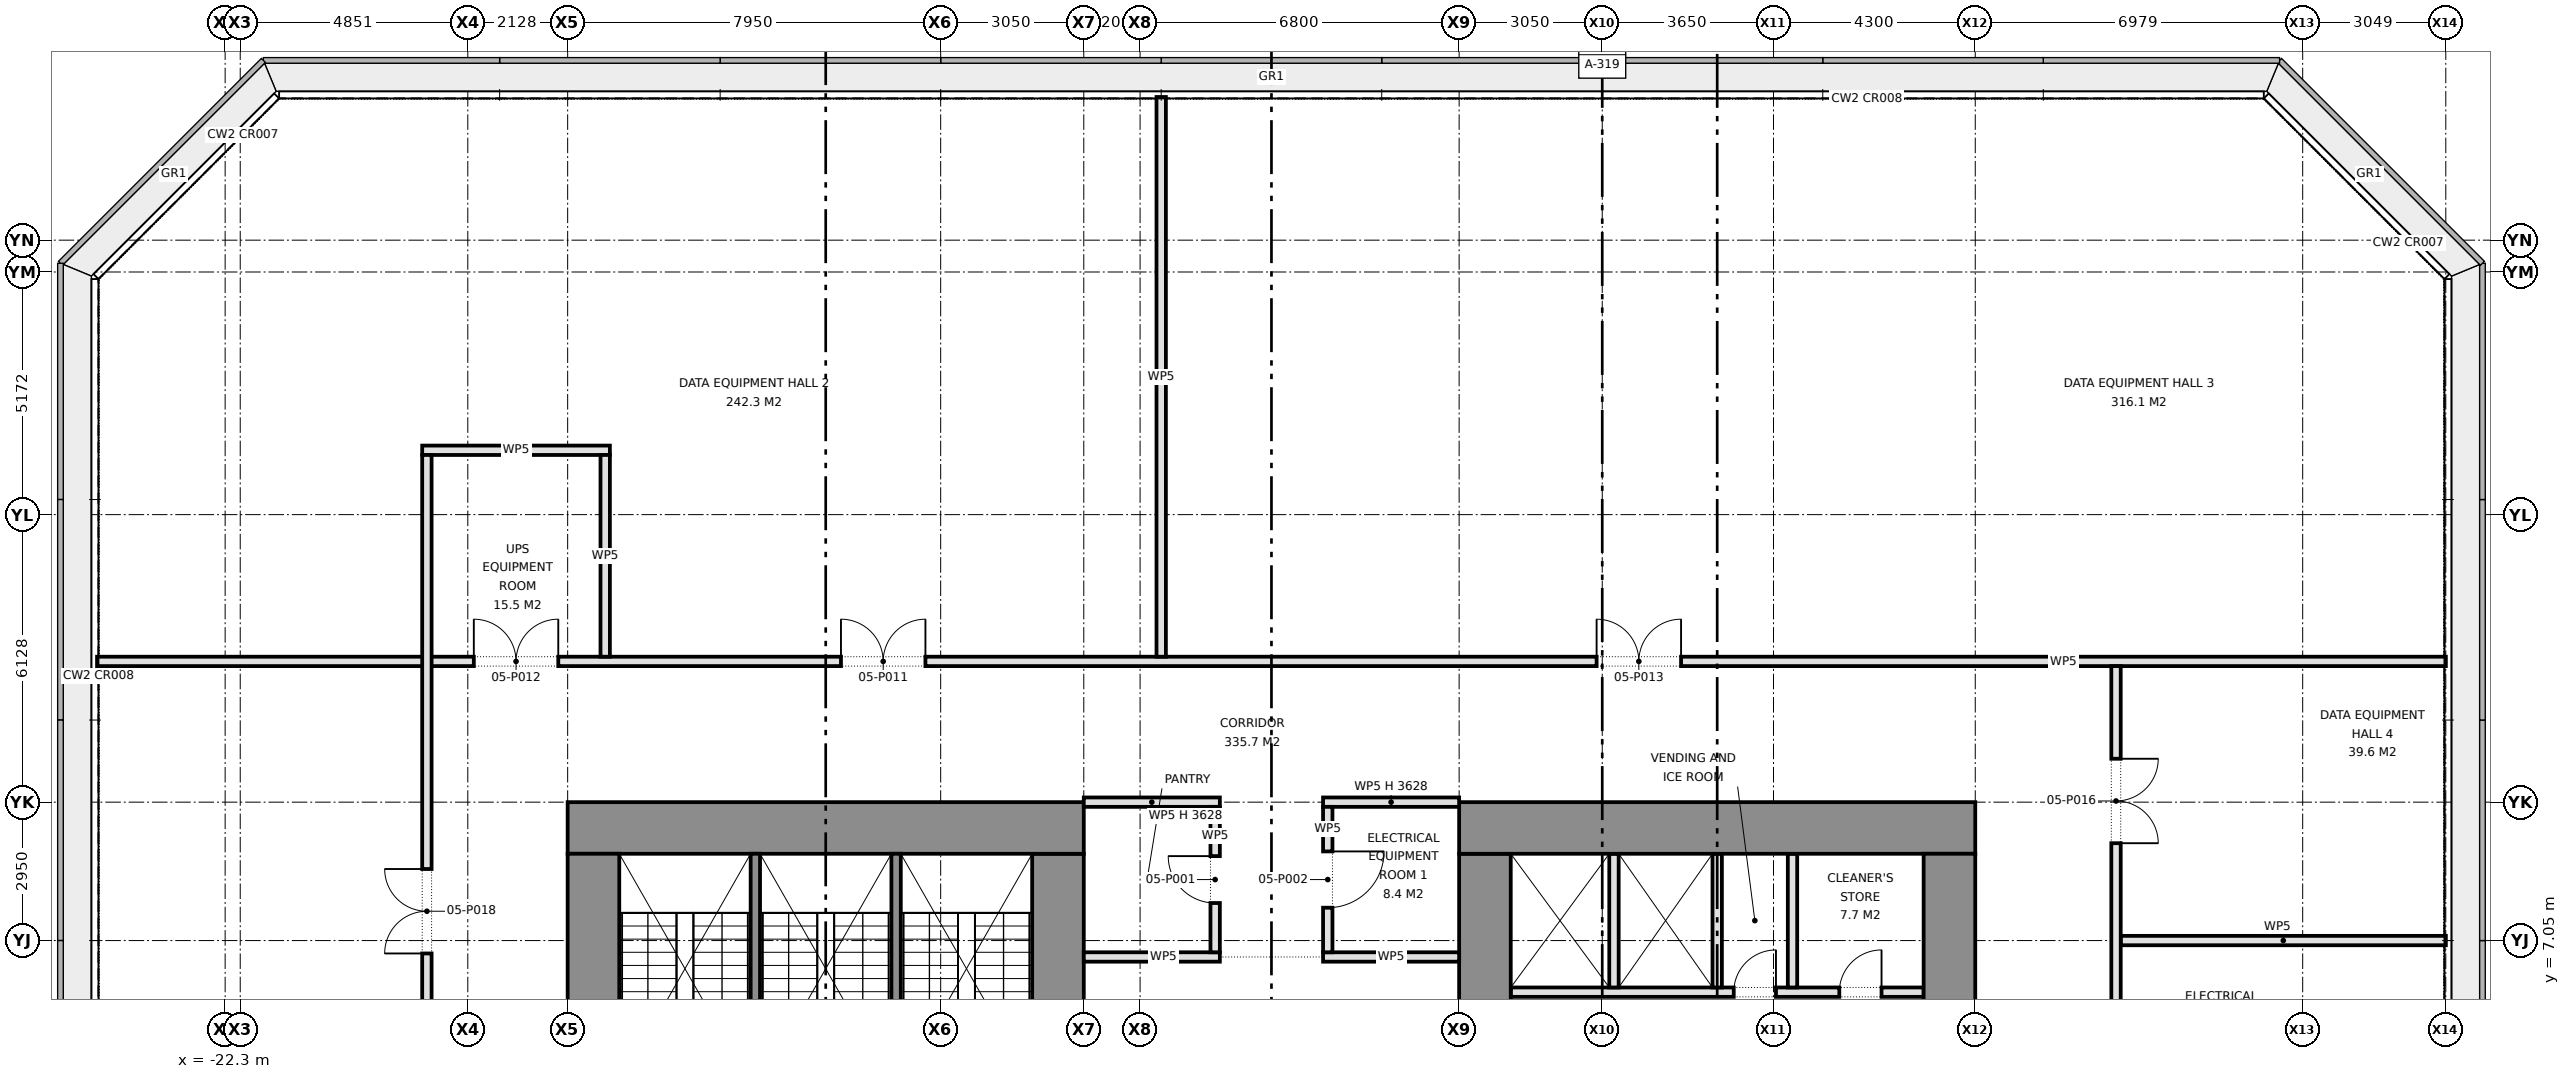
"""IFC4 building model, lengths in metres.
Left out: names, types, materials, properties, quantities, classifications, styles, units other than length and angle.
Written with IfcOpenShell. Run it as: python <this file> out.ifc"""

import sys

from ifc_helpers import new_model, si_unit, direction, frame, frame_2d, origin, place, context, subcontext, project, spatial, rectangle, extrude, element, fill, save


model = new_model("IFC4")
c1 = context("Model", 3, precision=1e-05, world=origin(), true_north=direction((0.0, 1.0)))
c2 = subcontext(c1, "Body", "Model", "MODEL_VIEW")
j1 = project(units=[si_unit("LENGTHUNIT", "METRE"), si_unit("PLANEANGLEUNIT", "RADIAN")], contexts=[c1])
p1 = place(None, origin())
s1 = spatial("IfcSite", under=j1, at=p1, CompositionType="ELEMENT")
p2 = place(p1, origin())
s2 = spatial("IfcBuilding", under=s1, at=p2, CompositionType="ELEMENT")
p3 = place(p2, frame((0.0, 0.0, 20.9)))
s3 = spatial("IfcBuildingStorey", under=s2, at=p3, CompositionType="ELEMENT", Elevation=20.9)
p4 = place(p3, frame((-15.0, 9.45, 0.0), z_axis=(0.0, 0.0, 1.0), x_axis=(1.0, 0.0, 0.0)))
e1 = element("IfcWall", 1, at=p4, inside=s3, PredefinedType="SHEAR", context=c2, shape_type="SweptSolid", body=[
    extrude(rectangle(XDim=11.0, YDim=1.1, at=frame_2d((5.5, 0.0))), origin(), (0.0, 0.0, 1.0), 4.575),
])
p5 = place(p3, frame((-14.45, 3.68, 0.0), z_axis=(0.0, 0.0, 1.0), x_axis=(0.0, 1.0, 0.0)))
e2 = element("IfcWall", 2, at=p5, inside=s3, PredefinedType="SHEAR", context=c2, shape_type="SweptSolid", body=[
    extrude(rectangle(XDim=5.22, YDim=1.1, at=frame_2d((2.61, 0.0))), origin(), (0.0, 0.0, 1.0), 4.575),
])
p6 = place(p3, frame((-4.55, 1.55, 0.0), z_axis=(0.0, 0.0, 1.0), x_axis=(0.0, 1.0, 0.0)))
e3 = element("IfcWall", 3, at=p6, inside=s3, PredefinedType="SHEAR", context=c2, shape_type="SweptSolid", body=[
    extrude(rectangle(XDim=7.35, YDim=1.1, at=frame_2d((3.675, 0.0))), origin(), (0.0, 0.0, 1.0), 4.575),
])
for number, where, z_axis, x_axis in (
    (4, (-11.0, 2.38, 0.0), (0.0, 0.0, 1.0), (0.0, 1.0, 0.0)),
    (5, (-8.0, 2.38, 0.0), (0.0, 0.0, 1.0), (0.0, 1.0, 0.0)),
):
    element("IfcWall", number, at=place(p3, frame(where, z_axis=z_axis, x_axis=x_axis)), inside=s3, PredefinedType="SHEAR", context=c2, shape_type="SweptSolid", body=[
        extrude(rectangle(XDim=6.52, YDim=0.2, at=frame_2d((3.26, 0.0))), origin(), (0.0, 0.0, 1.0), 4.575),
    ])
p7 = place(p3, frame((15.0, 9.45, 0.0), z_axis=(0.0, 0.0, 1.0), x_axis=(-1.0, 0.0, 0.0)))
e6 = element("IfcWall", 6, at=p7, inside=s3, PredefinedType="SHEAR", context=c2, shape_type="SweptSolid", body=[
    extrude(rectangle(XDim=11.0, YDim=1.1, at=frame_2d((5.5, 0.0))), origin(), (0.0, 0.0, 1.0), 4.575),
])
for number, where, z_axis, x_axis in (
    (7, (14.45, 8.9, 0.0), (0.0, 0.0, 1.0), (0.0, -1.0, 0.0)),
    (8, (4.55, 8.9, 0.0), (0.0, 0.0, 1.0), (0.0, -1.0, 0.0)),
):
    element("IfcWall", number, at=place(p3, frame(where, z_axis=z_axis, x_axis=x_axis)), inside=s3, PredefinedType="SHEAR", context=c2, shape_type="SweptSolid", body=[
        extrude(rectangle(XDim=3.15, YDim=1.1, at=frame_2d((1.575, 0.0))), origin(), (0.0, 0.0, 1.0), 4.575),
    ])
p8 = place(p3, frame((13.9, 5.95, 0.0), z_axis=(0.0, 0.0, 1.0), x_axis=(-1.0, 0.0, 0.0)))
e9 = element("IfcWall", 9, at=p8, inside=s3, PredefinedType="PARTITIONING", context=c2, shape_type="SweptSolid", body=[
    extrude(rectangle(XDim=8.8, YDim=0.2, at=frame_2d((4.4, 0.0))), origin(), (0.0, 0.0, 1.0), 4.575),
])
p9 = place(p8, frame((0.897, 0.0, 0.0)))
e10 = element("IfcOpeningElement", 10, at=p9, cuts=e9, PredefinedType="OPENING", context=c2, shape_type="SweptSolid", body=[
    extrude(rectangle(XDim=0.9, YDim=2.1, at=frame_2d((0.45, 1.05))), frame((0.0, 0.11, 0.0), z_axis=(0.0, -1.0, 0.0), x_axis=(1.0, 0.0, 0.0)), (0.0, 0.0, 1.0), 0.22),
])
p10 = place(p8, frame((3.147, 0.0, 0.0)))
e11 = element("IfcOpeningElement", 11, at=p10, cuts=e9, PredefinedType="OPENING", context=c2, shape_type="SweptSolid", body=[
    extrude(rectangle(XDim=0.9, YDim=2.1, at=frame_2d((0.45, 1.05))), frame((0.0, 0.11, 0.0), z_axis=(0.0, -1.0, 0.0), x_axis=(1.0, 0.0, 0.0)), (0.0, 0.0, 1.0), 0.22),
])
for number, where, z_axis, x_axis in (
    (12, (9.5, 8.9, 0.0), (0.0, 0.0, 1.0), (0.0, -1.0, 0.0)),
    (13, (7.3, 8.9, 0.0), (0.0, 0.0, 1.0), (0.0, -1.0, 0.0)),
    (14, (11.105, 8.9, 0.0), (0.0, 0.0, 1.0), (0.0, -1.0, 0.0)),
):
    element("IfcWall", number, at=place(p3, frame(where, z_axis=z_axis, x_axis=x_axis)), inside=s3, PredefinedType="PARTITIONING", context=c2, shape_type="SweptSolid", body=[
        extrude(rectangle(XDim=2.85, YDim=0.2, at=frame_2d((1.425, 0.0))), origin(), (0.0, 0.0, 1.0), 4.575),
    ])
for number, where, z_axis, x_axis in (
    (15, (-4.0, 6.7, 0.0), (0.0, 0.0, 1.0), (1.0, 0.0, 0.0)),
    (16, (1.1, 6.7, 0.0), (0.0, 0.0, 1.0), (1.0, 0.0, 0.0)),
):
    element("IfcWall", number, at=place(p3, frame(where, z_axis=z_axis, x_axis=x_axis)), inside=s3, PredefinedType="PARTITIONING", context=c2, shape_type="SweptSolid", body=[
        extrude(rectangle(XDim=2.9, YDim=0.2, at=frame_2d((1.45, 0.0))), origin(), (0.0, 0.0, 1.0), 4.575),
    ])
p11 = place(p3, frame((18.1, 7.05, 0.0), z_axis=(0.0, 0.0, 1.0), x_axis=(1.0, 0.0, 0.0)))
e17 = element("IfcWall", 17, at=p11, inside=s3, PredefinedType="PARTITIONING", context=c2, shape_type="SweptSolid", body=[
    extrude(rectangle(XDim=6.93, YDim=0.2, at=frame_2d((3.465, 0.0))), origin(), (0.0, 0.0, 1.0), 4.575),
])
for number, where, z_axis, x_axis in (
    (18, (-4.0, 10.0, 0.0), (0.0, 0.0, 1.0), (1.0, 0.0, 0.0)),
    (19, (1.1, 10.0, 0.0), (0.0, 0.0, 1.0), (1.0, 0.0, 0.0)),
):
    element("IfcWall", number, at=place(p3, frame(where, z_axis=z_axis, x_axis=x_axis)), inside=s3, PredefinedType="PARTITIONING", context=c2, shape_type="SweptSolid", body=[
        extrude(rectangle(XDim=2.9, YDim=0.2, at=frame_2d((1.45, 0.0))), origin(), (0.0, 0.0, 1.0), 3.628),
    ])
p12 = place(p3, frame((-25.03, 13.0, 0.0), z_axis=(0.0, 0.0, 1.0), x_axis=(1.0, 0.0, 0.0)))
e20 = element("IfcWall", 20, at=p12, inside=s3, PredefinedType="PARTITIONING", context=c2, shape_type="SweptSolid", body=[
    extrude(rectangle(XDim=50.06, YDim=0.2, at=frame_2d((25.03, 0.0))), origin(), (0.0, 0.0, 1.0), 4.575),
])
p13 = place(p12, frame((15.855, 0.0, 0.0)))
e21 = element("IfcOpeningElement", 21, at=p13, cuts=e20, PredefinedType="OPENING", context=c2, shape_type="SweptSolid", body=[
    extrude(rectangle(XDim=1.8, YDim=2.1, at=frame_2d((0.9, 1.05))), frame((0.0, 0.11, 0.0), z_axis=(0.0, -1.0, 0.0), x_axis=(1.0, 0.0, 0.0)), (0.0, 0.0, 1.0), 0.22),
])
p14 = place(p12, frame((8.03, 0.0, 0.0)))
e22 = element("IfcOpeningElement", 22, at=p14, cuts=e20, PredefinedType="OPENING", context=c2, shape_type="SweptSolid", body=[
    extrude(rectangle(XDim=1.8, YDim=2.1, at=frame_2d((0.9, 1.05))), frame((0.0, 0.11, 0.0), z_axis=(0.0, -1.0, 0.0), x_axis=(1.0, 0.0, 0.0)), (0.0, 0.0, 1.0), 0.22),
])
p15 = place(p12, frame((31.96, 0.0, 0.0)))
e23 = element("IfcOpeningElement", 23, at=p15, cuts=e20, PredefinedType="OPENING", context=c2, shape_type="SweptSolid", body=[
    extrude(rectangle(XDim=1.8, YDim=2.1, at=frame_2d((0.9, 1.05))), frame((0.0, 0.11, 0.0), z_axis=(0.0, -1.0, 0.0), x_axis=(1.0, 0.0, 0.0)), (0.0, 0.0, 1.0), 0.22),
])
p16 = place(p3, frame((-18.1, 17.5, 0.0), z_axis=(0.0, 0.0, 1.0), x_axis=(1.0, 0.0, 0.0)))
e24 = element("IfcWall", 24, at=p16, inside=s3, PredefinedType="PARTITIONING", context=c2, shape_type="SweptSolid", body=[
    extrude(rectangle(XDim=4.0, YDim=0.2, at=frame_2d((2.0, 0.0))), origin(), (0.0, 0.0, 1.0), 4.575),
])
p17 = place(p3, frame((18.0, -12.9, 0.0), z_axis=(0.0, 0.0, 1.0), x_axis=(0.0, 1.0, 0.0)))
e25 = element("IfcWall", 25, at=p17, inside=s3, PredefinedType="PARTITIONING", context=c2, shape_type="SweptSolid", body=[
    extrude(rectangle(XDim=25.8, YDim=0.2, at=frame_2d((12.9, 0.0))), origin(), (0.0, 0.0, 1.0), 4.575),
])
p18 = place(p17, frame((4.725, 0.0, 0.0)))
e26 = element("IfcOpeningElement", 26, at=p18, cuts=e25, PredefinedType="OPENING", context=c2, shape_type="SweptSolid", body=[
    extrude(rectangle(XDim=1.0, YDim=2.1, at=frame_2d((0.5, 1.05))), frame((0.0, 0.11, 0.0), z_axis=(0.0, -1.0, 0.0), x_axis=(1.0, 0.0, 0.0)), (0.0, 0.0, 1.0), 0.22),
])
p19 = place(p17, frame((14.65, 0.0, 0.0)))
e27 = element("IfcOpeningElement", 27, at=p19, cuts=e25, PredefinedType="OPENING", context=c2, shape_type="SweptSolid", body=[
    extrude(rectangle(XDim=1.2, YDim=2.1, at=frame_2d((0.6, 1.05))), frame((0.0, 0.11, 0.0), z_axis=(0.0, -1.0, 0.0), x_axis=(1.0, 0.0, 0.0)), (0.0, 0.0, 1.0), 0.22),
])
p20 = place(p17, frame((22.025, 0.0, 0.0)))
e28 = element("IfcOpeningElement", 28, at=p20, cuts=e25, PredefinedType="OPENING", context=c2, shape_type="SweptSolid", body=[
    extrude(rectangle(XDim=1.8, YDim=2.1, at=frame_2d((0.9, 1.05))), frame((0.0, 0.11, 0.0), z_axis=(0.0, -1.0, 0.0), x_axis=(1.0, 0.0, 0.0)), (0.0, 0.0, 1.0), 0.22),
])
p21 = place(p3, frame((1.2, 6.8, 0.0), z_axis=(0.0, 0.0, 1.0), x_axis=(0.0, 1.0, 0.0)))
e29 = element("IfcWall", 29, at=p21, inside=s3, PredefinedType="PARTITIONING", context=c2, shape_type="SweptSolid", body=[
    extrude(rectangle(XDim=3.1, YDim=0.2, at=frame_2d((1.55, 0.0))), origin(), (0.0, 0.0, 1.0), 4.575),
])
p22 = place(p21, frame((0.95, 0.0, 0.0)))
e30 = element("IfcOpeningElement", 30, at=p22, cuts=e29, PredefinedType="OPENING", context=c2, shape_type="SweptSolid", body=[
    extrude(rectangle(XDim=1.2, YDim=2.1, at=frame_2d((0.6, 1.05))), frame((0.0, 0.11, 0.0), z_axis=(0.0, -1.0, 0.0), x_axis=(1.0, 0.0, 0.0)), (0.0, 0.0, 1.0), 0.22),
])
p23 = place(p3, frame((-1.2, 6.8, 0.0), z_axis=(0.0, 0.0, 1.0), x_axis=(0.0, 1.0, 0.0)))
e31 = element("IfcWall", 31, at=p23, inside=s3, PredefinedType="PARTITIONING", context=c2, shape_type="SweptSolid", body=[
    extrude(rectangle(XDim=3.1, YDim=0.2, at=frame_2d((1.55, 0.0))), origin(), (0.0, 0.0, 1.0), 4.575),
])
p24 = place(p23, frame((1.05, 0.0, 0.0)))
e32 = element("IfcOpeningElement", 32, at=p24, cuts=e31, PredefinedType="OPENING", context=c2, shape_type="SweptSolid", body=[
    extrude(rectangle(XDim=1.0, YDim=2.1, at=frame_2d((0.5, 1.05))), frame((0.0, 0.11, 0.0), z_axis=(0.0, -1.0, 0.0), x_axis=(1.0, 0.0, 0.0)), (0.0, 0.0, 1.0), 0.22),
])
p25 = place(p3, frame((-2.35, 13.1, 0.0), z_axis=(0.0, 0.0, 1.0), x_axis=(0.0, 1.0, 0.0)))
e33 = element("IfcWall", 33, at=p25, inside=s3, PredefinedType="PARTITIONING", context=c2, shape_type="SweptSolid", body=[
    extrude(rectangle(XDim=11.93, YDim=0.2, at=frame_2d((5.965, 0.0))), origin(), (0.0, 0.0, 1.0), 4.575),
])
p26 = place(p3, frame((-14.2, 13.1, 0.0), z_axis=(0.0, 0.0, 1.0), x_axis=(0.0, 1.0, 0.0)))
e34 = element("IfcWall", 34, at=p26, inside=s3, PredefinedType="PARTITIONING", context=c2, shape_type="SweptSolid", body=[
    extrude(rectangle(XDim=4.3, YDim=0.2, at=frame_2d((2.15, 0.0))), origin(), (0.0, 0.0, 1.0), 4.575),
])
p27 = place(p3, frame((-18.0, -12.9, 0.0), z_axis=(0.0, 0.0, 1.0), x_axis=(0.0, 1.0, 0.0)))
e35 = element("IfcWall", 35, at=p27, inside=s3, PredefinedType="PARTITIONING", context=c2, shape_type="SweptSolid", body=[
    extrude(rectangle(XDim=30.3, YDim=0.2, at=frame_2d((15.15, 0.0))), origin(), (0.0, 0.0, 1.0), 4.575),
])
p28 = place(p27, frame((6.675, 0.0, 0.0)))
e36 = element("IfcOpeningElement", 36, at=p28, cuts=e35, PredefinedType="OPENING", context=c2, shape_type="SweptSolid", body=[
    extrude(rectangle(XDim=1.8, YDim=2.1, at=frame_2d((0.9, 1.05))), frame((0.0, 0.11, 0.0), z_axis=(0.0, -1.0, 0.0), x_axis=(1.0, 0.0, 0.0)), (0.0, 0.0, 1.0), 0.22),
])
p29 = place(p27, frame((19.675, 0.0, 0.0)))
e37 = element("IfcOpeningElement", 37, at=p29, cuts=e35, PredefinedType="OPENING", context=c2, shape_type="SweptSolid", body=[
    extrude(rectangle(XDim=1.8, YDim=2.1, at=frame_2d((0.9, 1.05))), frame((0.0, 0.11, 0.0), z_axis=(0.0, -1.0, 0.0), x_axis=(1.0, 0.0, 0.0)), (0.0, 0.0, 1.0), 0.22),
])
p30 = place(p9, frame((0.9, 0.0, 0.0), z_axis=(0.0, 0.0, 1.0), x_axis=(-1.0, 0.0, 0.0)))
e38 = element("IfcDoor", 38, at=p30, inside=s3, OperationType="SINGLE_SWING_RIGHT", PredefinedType="DOOR", context=c2, shape_type="SweptSolid", body=[
    extrude(rectangle(XDim=0.9, YDim=2.1, at=frame_2d((0.45, 1.05))), frame((0.0, 0.025, 0.0), z_axis=(0.0, -1.0, 0.0), x_axis=(1.0, 0.0, 0.0)), (0.0, 0.0, 1.0), 0.05),
])
fill(e10, e38)
p31 = place(p10, frame((0.9, 0.0, 0.0), z_axis=(0.0, 0.0, 1.0), x_axis=(-1.0, 0.0, 0.0)))
e39 = element("IfcDoor", 39, at=p31, inside=s3, OperationType="SINGLE_SWING_RIGHT", PredefinedType="DOOR", context=c2, shape_type="SweptSolid", body=[
    extrude(rectangle(XDim=0.9, YDim=2.1, at=frame_2d((0.45, 1.05))), frame((0.0, 0.025, 0.0), z_axis=(0.0, -1.0, 0.0), x_axis=(1.0, 0.0, 0.0)), (0.0, 0.0, 1.0), 0.05),
])
fill(e11, e39)
p32 = place(p24, origin())
e40 = element("IfcDoor", 40, at=p32, inside=s3, OperationType="SINGLE_SWING_RIGHT", PredefinedType="DOOR", context=c2, shape_type="SweptSolid", body=[
    extrude(rectangle(XDim=1.0, YDim=2.1, at=frame_2d((0.5, 1.05))), frame((0.0, 0.025, 0.0), z_axis=(0.0, -1.0, 0.0), x_axis=(1.0, 0.0, 0.0)), (0.0, 0.0, 1.0), 0.05),
])
fill(e32, e40)
p33 = place(p22, frame((1.2, 0.0, 0.0), z_axis=(0.0, 0.0, 1.0), x_axis=(-1.0, 0.0, 0.0)))
e41 = element("IfcDoor", 41, at=p33, inside=s3, OperationType="SINGLE_SWING_LEFT", PredefinedType="DOOR", context=c2, shape_type="SweptSolid", body=[
    extrude(rectangle(XDim=1.2, YDim=2.1, at=frame_2d((0.6, 1.05))), frame((0.0, 0.025, 0.0), z_axis=(0.0, -1.0, 0.0), x_axis=(1.0, 0.0, 0.0)), (0.0, 0.0, 1.0), 0.05),
])
fill(e30, e41)
p34 = place(p13, origin())
e42 = element("IfcDoor", 42, at=p34, inside=s3, OperationType="DOUBLE_DOOR_SINGLE_SWING", PredefinedType="DOOR", context=c2, shape_type="SweptSolid", body=[
    extrude(rectangle(XDim=1.8, YDim=2.1, at=frame_2d((0.9, 1.05))), frame((0.0, 0.025, 0.0), z_axis=(0.0, -1.0, 0.0), x_axis=(1.0, 0.0, 0.0)), (0.0, 0.0, 1.0), 0.05),
])
fill(e21, e42)
p35 = place(p14, origin())
e43 = element("IfcDoor", 43, at=p35, inside=s3, OperationType="DOUBLE_DOOR_SINGLE_SWING", PredefinedType="DOOR", context=c2, shape_type="SweptSolid", body=[
    extrude(rectangle(XDim=1.8, YDim=2.1, at=frame_2d((0.9, 1.05))), frame((0.0, 0.025, 0.0), z_axis=(0.0, -1.0, 0.0), x_axis=(1.0, 0.0, 0.0)), (0.0, 0.0, 1.0), 0.05),
])
fill(e22, e43)
p36 = place(p15, origin())
e44 = element("IfcDoor", 44, at=p36, inside=s3, OperationType="DOUBLE_DOOR_SINGLE_SWING", PredefinedType="DOOR", context=c2, shape_type="SweptSolid", body=[
    extrude(rectangle(XDim=1.8, YDim=2.1, at=frame_2d((0.9, 1.05))), frame((0.0, 0.025, 0.0), z_axis=(0.0, -1.0, 0.0), x_axis=(1.0, 0.0, 0.0)), (0.0, 0.0, 1.0), 0.05),
])
fill(e23, e44)
p37 = place(p20, frame((1.8, 0.0, 0.0), z_axis=(0.0, 0.0, 1.0), x_axis=(-1.0, 0.0, 0.0)))
e45 = element("IfcDoor", 45, at=p37, inside=s3, OperationType="DOUBLE_DOOR_SINGLE_SWING", PredefinedType="DOOR", context=c2, shape_type="SweptSolid", body=[
    extrude(rectangle(XDim=1.8, YDim=2.1, at=frame_2d((0.9, 1.05))), frame((0.0, 0.025, 0.0), z_axis=(0.0, -1.0, 0.0), x_axis=(1.0, 0.0, 0.0)), (0.0, 0.0, 1.0), 0.05),
])
fill(e28, e45)
p38 = place(p29, origin())
e46 = element("IfcDoor", 46, at=p38, inside=s3, OperationType="DOUBLE_DOOR_SINGLE_SWING", PredefinedType="DOOR", context=c2, shape_type="SweptSolid", body=[
    extrude(rectangle(XDim=1.8, YDim=2.1, at=frame_2d((0.9, 1.05))), frame((0.0, 0.025, 0.0), z_axis=(0.0, -1.0, 0.0), x_axis=(1.0, 0.0, 0.0)), (0.0, 0.0, 1.0), 0.05),
])
fill(e37, e46)
save(model, sys.argv[1])
